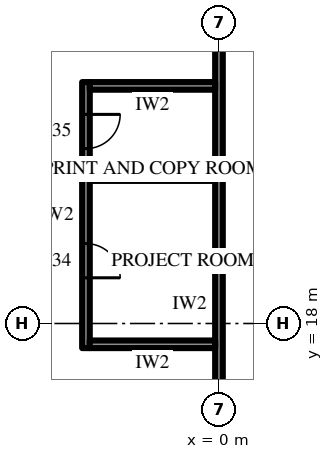
"""IFC4 building model, lengths in metres.
Left out: names, types, materials, properties, quantities, classifications, styles, units other than length and angle.
Written with IfcOpenShell. Run it as: python <this file> out.ifc"""

import sys

from ifc_helpers import new_model, si_unit, direction, frame, frame_2d, origin, place, context, subcontext, project, spatial, rectangle, extrude, element, fill, save


model = new_model("IFC4")
c1 = context("Model", 3, precision=1e-05, world=origin(), true_north=direction((0.0, 1.0)))
c2 = subcontext(c1, "Body", "Model", "MODEL_VIEW")
j1 = project(units=[si_unit("LENGTHUNIT", "METRE"), si_unit("PLANEANGLEUNIT", "RADIAN")], contexts=[c1])
p1 = place(None, origin())
s1 = spatial("IfcSite", under=j1, at=p1, CompositionType="ELEMENT")
p2 = place(p1, origin())
s2 = spatial("IfcBuilding", under=s1, at=p2, CompositionType="ELEMENT")
p3 = place(p2, frame((0.0, 0.0, 261.7)))
s3 = spatial("IfcBuildingStorey", under=s2, at=p3, CompositionType="ELEMENT", Elevation=261.7)
p4 = place(p3, frame((0.0, 12.3, 0.0), z_axis=(0.0, 0.0, 1.0), x_axis=(0.0, 1.0, 0.0)))
e1 = element("IfcWall", 1, at=p4, inside=s3, PredefinedType="PARTITIONING", context=c2, shape_type="SweptSolid", body=[
    extrude(rectangle(XDim=15.55, YDim=0.2, at=frame_2d((7.775, 0.0))), origin(), (0.0, 0.0, 1.0), 2.992),
])
p5 = place(p4, frame((1.055, 0.0, 0.0)))
e2 = element("IfcOpeningElement", 2, at=p5, cuts=e1, PredefinedType="OPENING", context=c2, shape_type="SweptSolid", body=[
    extrude(rectangle(XDim=1.0, YDim=2.2, at=frame_2d((0.5, 1.1))), frame((0.0, 0.11, 0.0), z_axis=(0.0, -1.0, 0.0), x_axis=(1.0, 0.0, 0.0)), (0.0, 0.0, 1.0), 0.22),
])
p6 = place(p3, frame((-3.5, 17.353, 0.0), z_axis=(0.0, 0.0, 1.0), x_axis=(0.0, 1.0, 0.0)))
e3 = element("IfcWall", 3, at=p6, inside=s3, PredefinedType="PARTITIONING", context=c2, shape_type="SweptSolid", body=[
    extrude(rectangle(XDim=7.0, YDim=0.2, at=frame_2d((3.5, 0.0))), origin(), (0.0, 0.0, 1.0), 4.0),
])
p7 = place(p6, frame((1.85, 0.0, 0.0)))
e4 = element("IfcOpeningElement", 4, at=p7, cuts=e3, PredefinedType="OPENING", context=c2, shape_type="SweptSolid", body=[
    extrude(rectangle(XDim=0.9, YDim=2.2, at=frame_2d((0.45, 1.1))), frame((0.0, 0.11, 0.0), z_axis=(0.0, -1.0, 0.0), x_axis=(1.0, 0.0, 0.0)), (0.0, 0.0, 1.0), 0.22),
])
p8 = place(p6, frame((5.25, 0.0, 0.0)))
e5 = element("IfcOpeningElement", 5, at=p8, cuts=e3, PredefinedType="OPENING", context=c2, shape_type="SweptSolid", body=[
    extrude(rectangle(XDim=0.9, YDim=2.2, at=frame_2d((0.45, 1.1))), frame((0.0, 0.11, 0.0), z_axis=(0.0, -1.0, 0.0), x_axis=(1.0, 0.0, 0.0)), (0.0, 0.0, 1.0), 0.22),
])
for number, where, z_axis, x_axis in (
    (6, (-0.1, 17.452, 0.0), (0.0, 0.0, 1.0), (-1.0, 0.0, 0.0)),
    (7, (-0.1, 21.853, 0.0), (0.0, 0.0, 1.0), (-1.0, 0.0, 0.0)),
    (8, (-0.1, 24.252, 0.0), (0.0, 0.0, 1.0), (-1.0, 0.0, 0.0)),
):
    element("IfcWall", number, at=place(p3, frame(where, z_axis=z_axis, x_axis=x_axis)), inside=s3, PredefinedType="PARTITIONING", context=c2, shape_type="SweptSolid", body=[
        extrude(rectangle(XDim=3.3, YDim=0.2, at=frame_2d((1.65, 0.0))), origin(), (0.0, 0.0, 1.0), 4.0),
    ])
p9 = place(p7, frame((0.9, 0.0, 0.0), z_axis=(0.0, 0.0, 1.0), x_axis=(-1.0, 0.0, 0.0)))
e9 = element("IfcDoor", 9, at=p9, inside=s3, OperationType="SINGLE_SWING_LEFT", PredefinedType="DOOR", context=c2, shape_type="SweptSolid", body=[
    extrude(rectangle(XDim=0.9, YDim=2.2, at=frame_2d((0.45, 1.1))), frame((0.0, 0.025, 0.0), z_axis=(0.0, -1.0, 0.0), x_axis=(1.0, 0.0, 0.0)), (0.0, 0.0, 1.0), 0.05),
])
fill(e4, e9)
p10 = place(p8, frame((0.9, 0.0, 0.0), z_axis=(0.0, 0.0, 1.0), x_axis=(-1.0, 0.0, 0.0)))
e10 = element("IfcDoor", 10, at=p10, inside=s3, OperationType="SINGLE_SWING_RIGHT", PredefinedType="DOOR", context=c2, shape_type="SweptSolid", body=[
    extrude(rectangle(XDim=0.9, YDim=2.2, at=frame_2d((0.45, 1.1))), frame((0.0, 0.025, 0.0), z_axis=(0.0, -1.0, 0.0), x_axis=(1.0, 0.0, 0.0)), (0.0, 0.0, 1.0), 0.05),
])
fill(e5, e10)
save(model, sys.argv[1])
